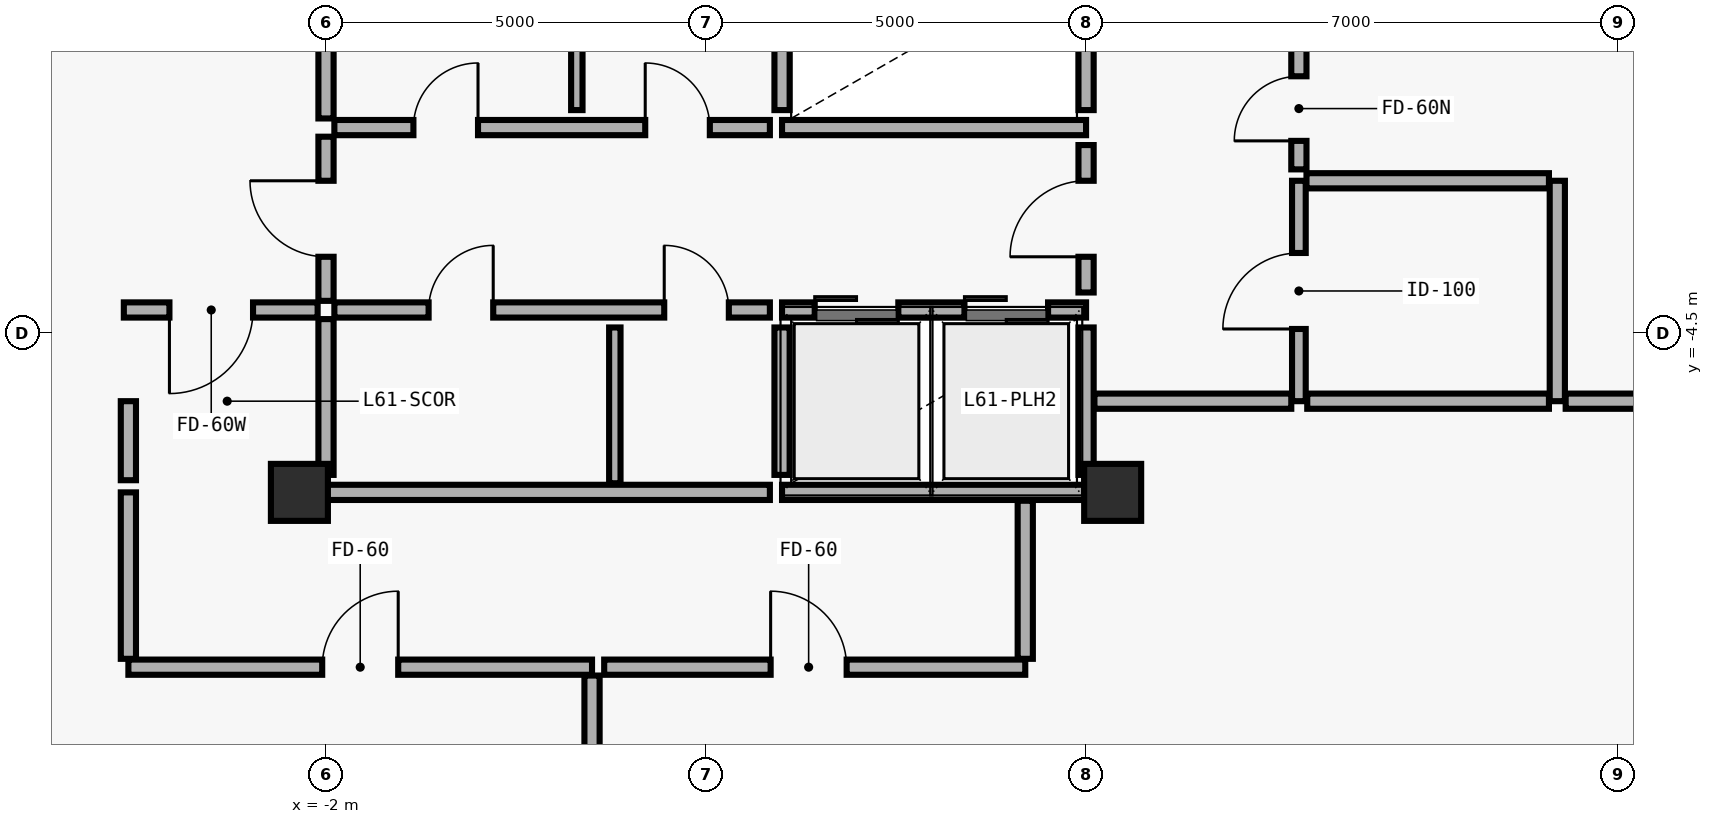
"""IFC4 building model, lengths in metres.
Left out: names, types, materials, properties, quantities, classifications, styles, units other than length and angle.
Written with IfcOpenShell. Run it as: python <this file> out.ifc"""

import sys

from ifc_helpers import new_model, si_unit, direction, frame, frame_2d, origin, origin_2d, place, context, subcontext, project, spatial, rectangle, extrude, element, fill, save


model = new_model("IFC4")
c1 = context("Model", 3, precision=1e-05, world=origin(), true_north=direction((0.0, 1.0)))
c2 = subcontext(c1, "Body", "Model", "MODEL_VIEW")
j1 = project(units=[si_unit("LENGTHUNIT", "METRE"), si_unit("PLANEANGLEUNIT", "RADIAN")], contexts=[c1])
p1 = place(None, origin())
s1 = spatial("IfcSite", under=j1, at=p1, CompositionType="ELEMENT")
p2 = place(p1, origin())
s2 = spatial("IfcBuilding", under=s1, at=p2, CompositionType="ELEMENT")
p3 = place(p2, frame((0.0, 0.0, 240.0)))
s3 = spatial("IfcBuildingStorey", under=s2, at=p3, CompositionType="ELEMENT", Elevation=240.0)
for number, where, z_axis, x_axis in (
    (1, (-2.35, -6.6, 0.0), (0.0, 0.0, 1.0), (1.0, 0.0, 0.0)),
    (2, (8.35, -6.6, 0.0), (0.0, 0.0, 1.0), (1.0, 0.0, 0.0)),
):
    element("IfcColumn", number, at=place(p3, frame(where, z_axis=z_axis, x_axis=x_axis)), inside=s3, PredefinedType="COLUMN", context=c2, shape_type="SweptSolid", body=[
        extrude(rectangle(XDim=0.75, YDim=0.75, at=origin_2d()), origin(), (0.0, 0.0, 1.0), 5.375),
    ])
p4 = place(p3, frame((-4.566, -15.429, 0.0), z_axis=(0.0, 0.0, 1.0), x_axis=(-0.716559160108, 0.69752632213, 0.0)))
e3 = element("IfcWall", 3, at=p4, inside=s3, PredefinedType="SOLIDWALL", context=c2, shape_type="SweptSolid", body=[
    extrude(rectangle(XDim=8.979, YDim=0.28, at=frame_2d((4.49, 0.0))), origin(), (0.0, 0.0, 1.0), 4.77),
])
p5 = place(p3, frame((20.7, -9.166, 0.0), z_axis=(0.0, 0.0, 1.0), x_axis=(-0.716545930731, -0.697539912229, 0.0)))
e4 = element("IfcWall", 4, at=p5, inside=s3, PredefinedType="SOLIDWALL", context=c2, shape_type="SweptSolid", body=[
    extrude(rectangle(XDim=8.979, YDim=0.28, at=frame_2d((4.49, 0.0))), origin(), (0.0, 0.0, 1.0), 4.77),
])
p6 = place(p3, frame((4.0, -1.8, 0.0), z_axis=(0.0, 0.0, 1.0), x_axis=(1.0, 0.0, 0.0)))
e5 = element("IfcWall", 5, at=p6, inside=s3, PredefinedType="SOLIDWALL", context=c2, shape_type="SweptSolid", body=[
    extrude(rectangle(XDim=4.0, YDim=0.2, at=frame_2d((2.0, 0.0))), origin(), (0.0, 0.0, 1.0), 5.16),
])
p7 = place(p3, frame((4.0, -1.57, 0.0), z_axis=(0.0, 0.0, 1.0), x_axis=(0.0, 1.0, 0.0)))
e6 = element("IfcWall", 6, at=p7, inside=s3, PredefinedType="SOLIDWALL", context=c2, shape_type="SweptSolid", body=[
    extrude(rectangle(XDim=1.94, YDim=0.2, at=frame_2d((0.97, 0.0))), origin(), (0.0, 0.0, 1.0), 5.16),
])
p8 = place(p3, frame((8.0, -1.57, 0.0), z_axis=(0.0, 0.0, 1.0), x_axis=(0.0, 1.0, 0.0)))
e7 = element("IfcWall", 7, at=p8, inside=s3, PredefinedType="SOLIDWALL", context=c2, shape_type="SweptSolid", body=[
    extrude(rectangle(XDim=2.05, YDim=0.2, at=frame_2d((1.025, 0.0))), origin(), (0.0, 0.0, 1.0), 4.872),
])
p9 = place(p3, frame((4.0, -4.2, 0.0), z_axis=(0.0, 0.0, 1.0), x_axis=(1.0, 0.0, 0.0)))
e8 = element("IfcWall", 8, at=p9, inside=s3, PredefinedType="SOLIDWALL", context=c2, shape_type="SweptSolid", body=[
    extrude(rectangle(XDim=4.0, YDim=0.2, at=frame_2d((2.0, 0.0))), origin(), (0.0, 0.0, 1.0), 5.16),
])
p10 = place(p9, frame((0.43, 0.0, 0.0)))
e9 = element("IfcOpeningElement", 9, at=p10, cuts=e8, PredefinedType="OPENING", context=c2, shape_type="SweptSolid", body=[
    extrude(rectangle(XDim=1.1, YDim=2.2, at=frame_2d((0.55, 1.1))), frame((0.0, 0.11, 0.0), z_axis=(0.0, -1.0, 0.0), x_axis=(1.0, 0.0, 0.0)), (0.0, 0.0, 1.0), 0.22),
])
p11 = place(p9, frame((2.4, 0.0, 0.0)))
e10 = element("IfcOpeningElement", 10, at=p11, cuts=e8, PredefinedType="OPENING", context=c2, shape_type="SweptSolid", body=[
    extrude(rectangle(XDim=1.1, YDim=2.2, at=frame_2d((0.55, 1.1))), frame((0.0, 0.11, 0.0), z_axis=(0.0, -1.0, 0.0), x_axis=(1.0, 0.0, 0.0)), (0.0, 0.0, 1.0), 0.22),
])
p12 = place(p3, frame((4.0, -6.6, 0.0), z_axis=(0.0, 0.0, 1.0), x_axis=(1.0, 0.0, 0.0)))
e11 = element("IfcWall", 11, at=p12, inside=s3, PredefinedType="SOLIDWALL", context=c2, shape_type="SweptSolid", body=[
    extrude(rectangle(XDim=4.0, YDim=0.2, at=frame_2d((2.0, 0.0))), origin(), (0.0, 0.0, 1.0), 4.872),
])
p13 = place(p3, frame((4.0, -6.37, 0.0), z_axis=(0.0, 0.0, 1.0), x_axis=(0.0, 1.0, 0.0)))
e12 = element("IfcWall", 12, at=p13, inside=s3, PredefinedType="SOLIDWALL", context=c2, shape_type="SweptSolid", body=[
    extrude(rectangle(XDim=1.94, YDim=0.2, at=frame_2d((0.97, 0.0))), origin(), (0.0, 0.0, 1.0), 5.16),
])
p14 = place(p3, frame((8.0, -6.37, 0.0), z_axis=(0.0, 0.0, 1.0), x_axis=(0.0, 1.0, 0.0)))
e13 = element("IfcWall", 13, at=p14, inside=s3, PredefinedType="SOLIDWALL", context=c2, shape_type="SweptSolid", body=[
    extrude(rectangle(XDim=1.94, YDim=0.2, at=frame_2d((0.97, 0.0))), origin(), (0.0, 0.0, 1.0), 4.872),
])
p15 = place(p3, frame((-2.0, -4.08, 0.0), z_axis=(0.0, 0.0, 1.0), x_axis=(0.0, 1.0, 0.0)))
e14 = element("IfcWall", 14, at=p15, inside=s3, PredefinedType="MOVABLE", context=c2, shape_type="SweptSolid", body=[
    extrude(rectangle(XDim=2.16, YDim=0.2, at=frame_2d((1.08, 0.0))), origin(), (0.0, 0.0, 1.0), 4.872),
])
p16 = place(p15, frame((0.58, 0.0, 0.0)))
e15 = element("IfcOpeningElement", 15, at=p16, cuts=e14, PredefinedType="OPENING", context=c2, shape_type="SweptSolid", body=[
    extrude(rectangle(XDim=1.0, YDim=2.1, at=frame_2d((0.5, 1.05))), frame((0.0, 0.11, 0.0), z_axis=(0.0, -1.0, 0.0), x_axis=(1.0, 0.0, 0.0)), (0.0, 0.0, 1.0), 0.22),
])
p17 = place(p3, frame((8.0, -3.97, 0.0), z_axis=(0.0, 0.0, 1.0), x_axis=(0.0, 1.0, 0.0)))
e16 = element("IfcWall", 16, at=p17, inside=s3, PredefinedType="MOVABLE", context=c2, shape_type="SweptSolid", body=[
    extrude(rectangle(XDim=1.94, YDim=0.2, at=frame_2d((0.97, 0.0))), origin(), (0.0, 0.0, 1.0), 4.872),
])
p18 = place(p17, frame((0.47, 0.0, 0.0)))
e17 = element("IfcOpeningElement", 17, at=p18, cuts=e16, PredefinedType="OPENING", context=c2, shape_type="SweptSolid", body=[
    extrude(rectangle(XDim=1.0, YDim=2.1, at=frame_2d((0.5, 1.05))), frame((0.0, 0.11, 0.0), z_axis=(0.0, -1.0, 0.0), x_axis=(1.0, 0.0, 0.0)), (0.0, 0.0, 1.0), 0.22),
])
p19 = place(p3, frame((-1.89, -1.8, 0.0), z_axis=(0.0, 0.0, 1.0), x_axis=(1.0, 0.0, 0.0)))
e18 = element("IfcWall", 18, at=p19, inside=s3, PredefinedType="MOVABLE", context=c2, shape_type="SweptSolid", body=[
    extrude(rectangle(XDim=5.73, YDim=0.2, at=frame_2d((2.865, 0.0))), origin(), (0.0, 0.0, 1.0), 5.16),
])
p20 = place(p19, frame((1.04, 0.0, 0.0)))
e19 = element("IfcOpeningElement", 19, at=p20, cuts=e18, PredefinedType="OPENING", context=c2, shape_type="SweptSolid", body=[
    extrude(rectangle(XDim=0.85, YDim=2.1, at=frame_2d((0.425, 1.05))), frame((0.0, 0.11, 0.0), z_axis=(0.0, -1.0, 0.0), x_axis=(1.0, 0.0, 0.0)), (0.0, 0.0, 1.0), 0.22),
])
p21 = place(p19, frame((4.09, 0.0, 0.0)))
e20 = element("IfcOpeningElement", 20, at=p21, cuts=e18, PredefinedType="OPENING", context=c2, shape_type="SweptSolid", body=[
    extrude(rectangle(XDim=0.85, YDim=2.1, at=frame_2d((0.425, 1.05))), frame((0.0, 0.11, 0.0), z_axis=(0.0, -1.0, 0.0), x_axis=(1.0, 0.0, 0.0)), (0.0, 0.0, 1.0), 0.22),
])
p22 = place(p3, frame((-1.89, -4.2, 0.0), z_axis=(0.0, 0.0, 1.0), x_axis=(1.0, 0.0, 0.0)))
e21 = element("IfcWall", 21, at=p22, inside=s3, PredefinedType="MOVABLE", context=c2, shape_type="SweptSolid", body=[
    extrude(rectangle(XDim=5.73, YDim=0.2, at=frame_2d((2.865, 0.0))), origin(), (0.0, 0.0, 1.0), 5.16),
])
p23 = place(p22, frame((1.24, 0.0, 0.0)))
e22 = element("IfcOpeningElement", 22, at=p23, cuts=e21, PredefinedType="OPENING", context=c2, shape_type="SweptSolid", body=[
    extrude(rectangle(XDim=0.85, YDim=2.1, at=frame_2d((0.425, 1.05))), frame((0.0, 0.11, 0.0), z_axis=(0.0, -1.0, 0.0), x_axis=(1.0, 0.0, 0.0)), (0.0, 0.0, 1.0), 0.22),
])
p24 = place(p22, frame((4.34, 0.0, 0.0)))
e23 = element("IfcOpeningElement", 23, at=p24, cuts=e21, PredefinedType="OPENING", context=c2, shape_type="SweptSolid", body=[
    extrude(rectangle(XDim=0.85, YDim=2.1, at=frame_2d((0.425, 1.05))), frame((0.0, 0.11, 0.0), z_axis=(0.0, -1.0, 0.0), x_axis=(1.0, 0.0, 0.0)), (0.0, 0.0, 1.0), 0.22),
])
p25 = place(p3, frame((-2.11, -4.2, 0.0), z_axis=(0.0, 0.0, 1.0), x_axis=(-1.0, 0.0, 0.0)))
e24 = element("IfcWall", 24, at=p25, inside=s3, PredefinedType="MOVABLE", context=c2, shape_type="SweptSolid", body=[
    extrude(rectangle(XDim=2.55, YDim=0.2, at=frame_2d((1.275, 0.0))), origin(), (0.0, 0.0, 1.0), 5.16),
])
p26 = place(p25, frame((0.85, 0.0, 0.0)))
e25 = element("IfcOpeningElement", 25, at=p26, cuts=e24, PredefinedType="OPENING", context=c2, shape_type="SweptSolid", body=[
    extrude(rectangle(XDim=1.1, YDim=2.1, at=frame_2d((0.55, 1.05))), frame((0.0, 0.11, 0.0), z_axis=(0.0, -1.0, 0.0), x_axis=(1.0, 0.0, 0.0)), (0.0, 0.0, 1.0), 0.22),
])
p27 = place(p3, frame((10.8, -5.4, 0.0), z_axis=(0.0, 0.0, 1.0), x_axis=(0.0, 1.0, 0.0)))
e26 = element("IfcWall", 26, at=p27, inside=s3, PredefinedType="PLUMBINGWALL", context=c2, shape_type="SweptSolid", body=[
    extrude(rectangle(XDim=2.9, YDim=0.18, at=frame_2d((1.45, 0.0))), origin(), (0.0, 0.0, 1.0), 5.16),
])
p28 = place(p27, frame((0.95, 0.0, 0.0)))
e27 = element("IfcOpeningElement", 27, at=p28, cuts=e26, PredefinedType="OPENING", context=c2, shape_type="SweptSolid", body=[
    extrude(rectangle(XDim=1.0, YDim=2.1, at=frame_2d((0.5, 1.05))), frame((0.0, 0.1, 0.0), z_axis=(0.0, -1.0, 0.0), x_axis=(1.0, 0.0, 0.0)), (0.0, 0.0, 1.0), 0.2),
])
p29 = place(p3, frame((10.8, -2.35, 0.0), z_axis=(0.0, 0.0, 1.0), x_axis=(0.0, 1.0, 0.0)))
e28 = element("IfcWall", 28, at=p29, inside=s3, PredefinedType="MOVABLE", context=c2, shape_type="SweptSolid", body=[
    extrude(rectangle(XDim=1.59, YDim=0.2, at=frame_2d((0.795, 0.0))), origin(), (0.0, 0.0, 1.0), 5.16),
])
p30 = place(p29, frame((0.375, 0.0, 0.0)))
e29 = element("IfcOpeningElement", 29, at=p30, cuts=e28, PredefinedType="OPENING", context=c2, shape_type="SweptSolid", body=[
    extrude(rectangle(XDim=0.85, YDim=2.1, at=frame_2d((0.425, 1.05))), frame((0.0, 0.11, 0.0), z_axis=(0.0, -1.0, 0.0), x_axis=(1.0, 0.0, 0.0)), (0.0, 0.0, 1.0), 0.22),
])
p31 = place(p3, frame((-4.6, -8.9, 0.0), z_axis=(0.0, 0.0, 1.0), x_axis=(1.0, 0.0, 0.0)))
e30 = element("IfcWall", 30, at=p31, inside=s3, PredefinedType="MOVABLE", context=c2, shape_type="SweptSolid", body=[
    extrude(rectangle(XDim=6.1, YDim=0.2, at=frame_2d((3.05, 0.0))), origin(), (0.0, 0.0, 1.0), 5.16),
])
p32 = place(p31, frame((2.55, 0.0, 0.0)))
e31 = element("IfcOpeningElement", 31, at=p32, cuts=e30, PredefinedType="OPENING", context=c2, shape_type="SweptSolid", body=[
    extrude(rectangle(XDim=1.0, YDim=2.1, at=frame_2d((0.5, 1.05))), frame((0.0, 0.11, 0.0), z_axis=(0.0, -1.0, 0.0), x_axis=(1.0, 0.0, 0.0)), (0.0, 0.0, 1.0), 0.22),
])
p33 = place(p3, frame((1.66, -8.9, 0.0), z_axis=(0.0, 0.0, 1.0), x_axis=(1.0, 0.0, 0.0)))
e32 = element("IfcWall", 32, at=p33, inside=s3, PredefinedType="MOVABLE", context=c2, shape_type="SweptSolid", body=[
    extrude(rectangle(XDim=5.54, YDim=0.2, at=frame_2d((2.77, 0.0))), origin(), (0.0, 0.0, 1.0), 5.16),
])
p34 = place(p33, frame((2.19, 0.0, 0.0)))
e33 = element("IfcOpeningElement", 33, at=p34, cuts=e32, PredefinedType="OPENING", context=c2, shape_type="SweptSolid", body=[
    extrude(rectangle(XDim=1.0, YDim=2.1, at=frame_2d((0.5, 1.05))), frame((0.0, 0.11, 0.0), z_axis=(0.0, -1.0, 0.0), x_axis=(1.0, 0.0, 0.0)), (0.0, 0.0, 1.0), 0.22),
])
p35 = place(p3, frame((1.3, -1.57, 0.0), z_axis=(0.0, 0.0, 1.0), x_axis=(0.0, 1.0, 0.0)))
e34 = element("IfcWall", 34, at=p35, inside=s3, PredefinedType="PARTITIONING", context=c2, shape_type="SweptSolid", body=[
    extrude(rectangle(XDim=1.94, YDim=0.15, at=frame_2d((0.97, 0.0))), origin(), (0.0, 0.0, 1.0), 5.16),
])
p36 = place(p3, frame((-2.0, -1.68, 0.0), z_axis=(0.0, 0.0, 1.0), x_axis=(0.0, 1.0, 0.0)))
e35 = element("IfcWall", 35, at=p36, inside=s3, PredefinedType="MOVABLE", context=c2, shape_type="SweptSolid", body=[
    extrude(rectangle(XDim=2.16, YDim=0.2, at=frame_2d((1.08, 0.0))), origin(), (0.0, 0.0, 1.0), 4.872),
])
p37 = place(p3, frame((1.8, -6.48, 0.0), z_axis=(0.0, 0.0, 1.0), x_axis=(0.0, 1.0, 0.0)))
e36 = element("IfcWall", 36, at=p37, inside=s3, PredefinedType="PARTITIONING", context=c2, shape_type="SweptSolid", body=[
    extrude(rectangle(XDim=2.05, YDim=0.15, at=frame_2d((1.025, 0.0))), origin(), (0.0, 0.0, 1.0), 5.16),
])
p38 = place(p3, frame((-2.0, -6.6, 0.0), z_axis=(0.0, 0.0, 1.0), x_axis=(1.0, 0.0, 0.0)))
e37 = element("IfcWall", 37, at=p38, inside=s3, PredefinedType="MOVABLE", context=c2, shape_type="SweptSolid", body=[
    extrude(rectangle(XDim=5.84, YDim=0.2, at=frame_2d((2.92, 0.0))), origin(), (0.0, 0.0, 1.0), 4.872),
])
p39 = place(p3, frame((-2.0, -6.37, 0.0), z_axis=(0.0, 0.0, 1.0), x_axis=(0.0, 1.0, 0.0)))
e38 = element("IfcWall", 38, at=p39, inside=s3, PredefinedType="MOVABLE", context=c2, shape_type="SweptSolid", body=[
    extrude(rectangle(XDim=2.05, YDim=0.2, at=frame_2d((1.025, 0.0))), origin(), (0.0, 0.0, 1.0), 4.872),
])
p40 = place(p3, frame((-4.6, -6.6, 0.0), z_axis=(0.0, 0.0, 1.0), x_axis=(0.0, -1.0, 0.0)))
e39 = element("IfcWall", 39, at=p40, inside=s3, PredefinedType="MOVABLE", context=c2, shape_type="SweptSolid", body=[
    extrude(rectangle(XDim=2.19, YDim=0.2, at=frame_2d((1.095, 0.0))), origin(), (0.0, 0.0, 1.0), 5.16),
])
p41 = place(p3, frame((-4.6, -5.4, 0.0), z_axis=(0.0, 0.0, 1.0), x_axis=(0.0, -1.0, 0.0)))
e40 = element("IfcWall", 40, at=p41, inside=s3, PredefinedType="MOVABLE", context=c2, shape_type="SweptSolid", body=[
    extrude(rectangle(XDim=1.04, YDim=0.2, at=frame_2d((0.52, 0.0))), origin(), (0.0, 0.0, 1.0), 5.16),
])
p42 = place(p3, frame((7.2, -8.79, 0.0), z_axis=(0.0, 0.0, 1.0), x_axis=(0.0, 1.0, 0.0)))
e41 = element("IfcWall", 41, at=p42, inside=s3, PredefinedType="MOVABLE", context=c2, shape_type="SweptSolid", body=[
    extrude(rectangle(XDim=2.08, YDim=0.2, at=frame_2d((1.04, 0.0))), origin(), (0.0, 0.0, 1.0), 4.692),
])
p43 = place(p3, frame((8.11, -5.4, 0.0), z_axis=(0.0, 0.0, 1.0), x_axis=(1.0, 0.0, 0.0)))
e42 = element("IfcWall", 42, at=p43, inside=s3, PredefinedType="MOVABLE", context=c2, shape_type="SweptSolid", body=[
    extrude(rectangle(XDim=2.59, YDim=0.2, at=frame_2d((1.295, 0.0))), origin(), (0.0, 0.0, 1.0), 5.16),
])
p44 = place(p3, frame((14.2, -2.5, 0.0), z_axis=(0.0, 0.0, 1.0), x_axis=(0.0, -1.0, 0.0)))
e43 = element("IfcWall", 43, at=p44, inside=s3, PredefinedType="MOVABLE", context=c2, shape_type="SweptSolid", body=[
    extrude(rectangle(XDim=2.9, YDim=0.2, at=frame_2d((1.45, 0.0))), origin(), (0.0, 0.0, 1.0), 4.872),
])
p45 = place(p3, frame((10.9, -2.5, 0.0), z_axis=(0.0, 0.0, 1.0), x_axis=(1.0, 0.0, 0.0)))
e44 = element("IfcWall", 44, at=p45, inside=s3, PredefinedType="MOVABLE", context=c2, shape_type="SweptSolid", body=[
    extrude(rectangle(XDim=3.19, YDim=0.2, at=frame_2d((1.595, 0.0))), origin(), (0.0, 0.0, 1.0), 5.16),
])
p46 = place(p3, frame((14.09, -5.4, 0.0), z_axis=(0.0, 0.0, 1.0), x_axis=(-1.0, 0.0, 0.0)))
e45 = element("IfcWall", 45, at=p46, inside=s3, PredefinedType="MOVABLE", context=c2, shape_type="SweptSolid", body=[
    extrude(rectangle(XDim=3.18, YDim=0.2, at=frame_2d((1.59, 0.0))), origin(), (0.0, 0.0, 1.0), 5.16),
])
p47 = place(p3, frame((22.817, -5.4, 0.0), z_axis=(0.0, 0.0, 1.0), x_axis=(-1.0, 0.0, 0.0)))
e46 = element("IfcWall", 46, at=p47, inside=s3, PredefinedType="MOVABLE", context=c2, shape_type="SweptSolid", body=[
    extrude(rectangle(XDim=8.507, YDim=0.2, at=frame_2d((4.253, 0.0))), origin(), (0.0, 0.0, 1.0), 5.16),
])
p48 = place(p3, frame((1.5, -9.01, 0.0), z_axis=(0.0, 0.0, 1.0), x_axis=(0.0, -1.0, 0.0)))
e47 = element("IfcWall", 47, at=p48, inside=s3, PredefinedType="MOVABLE", context=c2, shape_type="SweptSolid", body=[
    extrude(rectangle(XDim=8.98, YDim=0.2, at=frame_2d((4.49, 0.0))), origin(), (0.0, 0.0, 1.0), 5.16),
])
p49 = place(p16, origin())
e48 = element("IfcDoor", 48, at=p49, inside=s3, OperationType="SINGLE_SWING_RIGHT", PredefinedType="DOOR", context=c2, shape_type="SweptSolid", body=[
    extrude(rectangle(XDim=1.0, YDim=2.1, at=frame_2d((0.5, 1.05))), frame((0.0, 0.025, 0.0), z_axis=(0.0, -1.0, 0.0), x_axis=(1.0, 0.0, 0.0)), (0.0, 0.0, 1.0), 0.05),
])
fill(e15, e48)
p50 = place(p18, origin())
e49 = element("IfcDoor", 49, at=p50, inside=s3, OperationType="SINGLE_SWING_LEFT", PredefinedType="DOOR", context=c2, shape_type="SweptSolid", body=[
    extrude(rectangle(XDim=1.0, YDim=2.1, at=frame_2d((0.5, 1.05))), frame((0.0, 0.025, 0.0), z_axis=(0.0, -1.0, 0.0), x_axis=(1.0, 0.0, 0.0)), (0.0, 0.0, 1.0), 0.05),
])
fill(e17, e49)
p51 = place(p20, origin())
e50 = element("IfcDoor", 50, at=p51, inside=s3, OperationType="SINGLE_SWING_RIGHT", PredefinedType="DOOR", context=c2, shape_type="SweptSolid", body=[
    extrude(rectangle(XDim=0.85, YDim=2.1, at=frame_2d((0.425, 1.05))), frame((0.0, 0.025, 0.0), z_axis=(0.0, -1.0, 0.0), x_axis=(1.0, 0.0, 0.0)), (0.0, 0.0, 1.0), 0.05),
])
fill(e19, e50)
p52 = place(p21, origin())
e51 = element("IfcDoor", 51, at=p52, inside=s3, OperationType="SINGLE_SWING_LEFT", PredefinedType="DOOR", context=c2, shape_type="SweptSolid", body=[
    extrude(rectangle(XDim=0.85, YDim=2.1, at=frame_2d((0.425, 1.05))), frame((0.0, 0.025, 0.0), z_axis=(0.0, -1.0, 0.0), x_axis=(1.0, 0.0, 0.0)), (0.0, 0.0, 1.0), 0.05),
])
fill(e20, e51)
p53 = place(p23, origin())
e52 = element("IfcDoor", 52, at=p53, inside=s3, OperationType="SINGLE_SWING_RIGHT", PredefinedType="DOOR", context=c2, shape_type="SweptSolid", body=[
    extrude(rectangle(XDim=0.85, YDim=2.1, at=frame_2d((0.425, 1.05))), frame((0.0, 0.025, 0.0), z_axis=(0.0, -1.0, 0.0), x_axis=(1.0, 0.0, 0.0)), (0.0, 0.0, 1.0), 0.05),
])
fill(e22, e52)
p54 = place(p24, origin())
e53 = element("IfcDoor", 53, at=p54, inside=s3, OperationType="SINGLE_SWING_LEFT", PredefinedType="DOOR", context=c2, shape_type="SweptSolid", body=[
    extrude(rectangle(XDim=0.85, YDim=2.1, at=frame_2d((0.425, 1.05))), frame((0.0, 0.025, 0.0), z_axis=(0.0, -1.0, 0.0), x_axis=(1.0, 0.0, 0.0)), (0.0, 0.0, 1.0), 0.05),
])
fill(e23, e53)
p55 = place(p26, origin())
e54 = element("IfcDoor", 54, at=p55, inside=s3, OperationType="SINGLE_SWING_RIGHT", PredefinedType="DOOR", context=c2, shape_type="SweptSolid", body=[
    extrude(rectangle(XDim=1.1, YDim=2.1, at=frame_2d((0.55, 1.05))), frame((0.0, 0.025, 0.0), z_axis=(0.0, -1.0, 0.0), x_axis=(1.0, 0.0, 0.0)), (0.0, 0.0, 1.0), 0.05),
])
fill(e25, e54)
p56 = place(p28, origin())
e55 = element("IfcDoor", 55, at=p56, inside=s3, OperationType="SINGLE_SWING_LEFT", PredefinedType="DOOR", context=c2, shape_type="SweptSolid", body=[
    extrude(rectangle(XDim=1.0, YDim=2.1, at=frame_2d((0.5, 1.05))), frame((0.0, 0.025, 0.0), z_axis=(0.0, -1.0, 0.0), x_axis=(1.0, 0.0, 0.0)), (0.0, 0.0, 1.0), 0.05),
])
fill(e27, e55)
p57 = place(p30, origin())
e56 = element("IfcDoor", 56, at=p57, inside=s3, OperationType="SINGLE_SWING_LEFT", PredefinedType="DOOR", context=c2, shape_type="SweptSolid", body=[
    extrude(rectangle(XDim=0.85, YDim=2.1, at=frame_2d((0.425, 1.05))), frame((0.0, 0.025, 0.0), z_axis=(0.0, -1.0, 0.0), x_axis=(1.0, 0.0, 0.0)), (0.0, 0.0, 1.0), 0.05),
])
fill(e29, e56)
p58 = place(p32, origin())
e57 = element("IfcDoor", 57, at=p58, inside=s3, OperationType="SINGLE_SWING_RIGHT", PredefinedType="DOOR", context=c2, shape_type="SweptSolid", body=[
    extrude(rectangle(XDim=1.0, YDim=2.1, at=frame_2d((0.5, 1.05))), frame((0.0, 0.025, 0.0), z_axis=(0.0, -1.0, 0.0), x_axis=(1.0, 0.0, 0.0)), (0.0, 0.0, 1.0), 0.05),
])
fill(e31, e57)
p59 = place(p34, origin())
e58 = element("IfcDoor", 58, at=p59, inside=s3, OperationType="SINGLE_SWING_LEFT", PredefinedType="DOOR", context=c2, shape_type="SweptSolid", body=[
    extrude(rectangle(XDim=1.0, YDim=2.1, at=frame_2d((0.5, 1.05))), frame((0.0, 0.025, 0.0), z_axis=(0.0, -1.0, 0.0), x_axis=(1.0, 0.0, 0.0)), (0.0, 0.0, 1.0), 0.05),
])
fill(e33, e58)
p60 = place(p10, origin())
e59 = element("IfcDoor", 59, at=p60, inside=s3, OperationType="DOUBLE_DOOR_SLIDING", PredefinedType="DOOR", context=c2, shape_type="SweptSolid", body=[
    extrude(rectangle(XDim=1.1, YDim=2.2, at=frame_2d((0.55, 1.1))), frame((0.0, 0.025, 0.0), z_axis=(0.0, -1.0, 0.0), x_axis=(1.0, 0.0, 0.0)), (0.0, 0.0, 1.0), 0.05),
])
fill(e9, e59)
p61 = place(p11, origin())
e60 = element("IfcDoor", 60, at=p61, inside=s3, OperationType="DOUBLE_DOOR_SLIDING", PredefinedType="DOOR", context=c2, shape_type="SweptSolid", body=[
    extrude(rectangle(XDim=1.1, YDim=2.2, at=frame_2d((0.55, 1.1))), frame((0.0, 0.025, 0.0), z_axis=(0.0, -1.0, 0.0), x_axis=(1.0, 0.0, 0.0)), (0.0, 0.0, 1.0), 0.05),
])
fill(e10, e60)
save(model, sys.argv[1])
